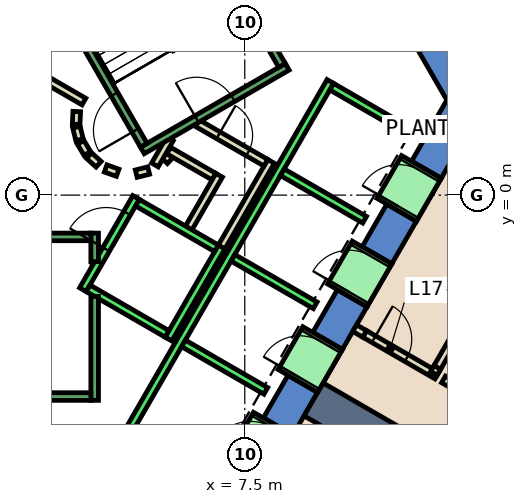
"""IFC4 building model, lengths in metres.
Left out: names, types, materials, properties, quantities, classifications, styles, units other than length and angle.
Written with IfcOpenShell. Run it as: python <this file> out.ifc"""

import sys

from ifc_helpers import new_model, si_unit, direction, frame, frame_2d, origin, place, context, subcontext, project, spatial, polyline, rectangle, outline, extrude, element, fill, save


model = new_model("IFC4")
c1 = context("Model", 3, precision=1e-05, world=origin(), true_north=direction((0.0, 1.0)))
c2 = subcontext(c1, "Body", "Model", "MODEL_VIEW")
j1 = project(units=[si_unit("LENGTHUNIT", "METRE"), si_unit("PLANEANGLEUNIT", "RADIAN")], contexts=[c1])
p1 = place(None, origin())
s1 = spatial("IfcSite", under=j1, at=p1, CompositionType="ELEMENT")
p2 = place(p1, origin())
s2 = spatial("IfcBuilding", under=s1, at=p2, CompositionType="ELEMENT")
p3 = place(p2, frame((0.0, 0.0, 81.2)))
s3 = spatial("IfcBuildingStorey", under=s2, at=p3, CompositionType="ELEMENT", Elevation=81.2)
p4 = place(p3, frame((0.0, 0.0, -0.6)))
e1 = element("IfcWall", 1, at=p4, inside=s3, PredefinedType="SHEAR", context=c2, shape_type="SweptSolid", body=[
    extrude(outline(polyline([(8.517, 11.747), (7.738, 11.298), (12.817, 2.5), (13.856, 2.5), (8.517, 11.747)])), origin(), (0.0, 0.0, 1.0), 5.4),
])
p5 = place(p3, frame((0.0, 0.0, -0.6)))
e2 = element("IfcWall", 2, at=p5, inside=s3, PredefinedType="SHEAR", context=c2, shape_type="SweptSolid", body=[
    extrude(outline(polyline([(9.417, -5.189), (8.638, -4.739), (7.988, -5.864), (8.767, -6.314), (9.417, -5.189)])), origin(), (0.0, 0.0, 1.0), 5.4),
])
p6 = place(p3, frame((0.0, 0.0, -0.6)))
e3 = element("IfcWall", 3, at=p6, inside=s3, PredefinedType="SHEAR", context=c2, shape_type="SweptSolid", body=[
    extrude(outline(polyline([(10.717, -2.937), (9.938, -2.487), (9.288, -3.613), (10.067, -4.063), (10.717, -2.937)])), origin(), (0.0, 0.0, 1.0), 5.4),
])
p7 = place(p3, frame((0.0, 0.0, -0.6)))
e4 = element("IfcWall", 4, at=p7, inside=s3, PredefinedType="SHEAR", context=c2, shape_type="SweptSolid", body=[
    extrude(outline(polyline([(12.017, -0.686), (11.238, -0.236), (10.588, -1.361), (11.367, -1.811), (12.017, -0.686)])), origin(), (0.0, 0.0, 1.0), 5.4),
])
p8 = place(p3, frame((0.0, 0.0, -0.6)))
e5 = element("IfcWall", 5, at=p8, inside=s3, PredefinedType="SHEAR", context=c2, shape_type="SweptSolid", body=[
    extrude(outline(polyline([(11.888, 0.89), (12.667, 0.44), (13.856, 2.5), (12.817, 2.5), (11.888, 0.89)])), origin(), (0.0, 0.0, 1.0), 5.4),
])
p9 = place(p3, frame((0.0, 0.0, 3.6)))
e6 = element("IfcWall", 6, at=p9, inside=s3, PredefinedType="SHEAR", context=c2, shape_type="SweptSolid", body=[
    extrude(outline(polyline([(8.767, -6.314), (7.988, -5.864), (7.338, -6.99), (8.117, -7.44), (8.767, -6.314)])), origin(), (0.0, 0.0, 1.0), 1.2),
])
p10 = place(p3, frame((0.0, 0.0, 3.6)))
e7 = element("IfcWall", 7, at=p10, inside=s3, PredefinedType="SHEAR", context=c2, shape_type="SweptSolid", body=[
    extrude(outline(polyline([(10.067, -4.063), (9.288, -3.613), (8.638, -4.739), (9.417, -5.189), (10.067, -4.063)])), origin(), (0.0, 0.0, 1.0), 1.2),
])
p11 = place(p3, frame((0.0, 0.0, 3.6)))
e8 = element("IfcWall", 8, at=p11, inside=s3, PredefinedType="SHEAR", context=c2, shape_type="SweptSolid", body=[
    extrude(outline(polyline([(11.367, -1.811), (10.588, -1.361), (9.938, -2.487), (10.717, -2.937), (11.367, -1.811)])), origin(), (0.0, 0.0, 1.0), 1.2),
])
p12 = place(p3, frame((0.0, 0.0, 3.6)))
e9 = element("IfcWall", 9, at=p12, inside=s3, PredefinedType="SHEAR", context=c2, shape_type="SweptSolid", body=[
    extrude(outline(polyline([(12.667, 0.44), (11.888, 0.89), (11.238, -0.236), (12.017, -0.686), (12.667, 0.44)])), origin(), (0.0, 0.0, 1.0), 1.2),
])
p13 = place(p3, frame((9.31, -5.375, 0.0), z_axis=(0.0, 0.0, 1.0), x_axis=(0.866022967049, -0.500004220526, 0.0)))
e10 = element("IfcWall", 10, at=p13, inside=s3, PredefinedType="SHEAR", context=c2, shape_type="SweptSolid", body=[
    extrude(rectangle(XDim=35.802, YDim=1.0, at=frame_2d((17.901, 0.0))), origin(), (0.0, 0.0, 1.0), 4.8),
])
p14 = place(p3, frame((5.39, 0.898, 0.0), z_axis=(0.0, 0.0, 1.0), x_axis=(0.673828488714, 0.738887791073, 0.0)))
e11 = element("IfcWall", 11, at=p14, inside=s3, PredefinedType="PARTITIONING", context=c2, shape_type="SweptSolid", body=[
    extrude(rectangle(XDim=0.263, YDim=0.2, at=frame_2d((0.131, 0.0))), origin(), (0.0, 0.0, 1.0), 4.8),
])
p15 = place(p3, frame((5.499, 1.172, 0.0), z_axis=(0.0, 0.0, 1.0), x_axis=(0.866333505267, -0.499465972466, 0.0)))
e12 = element("IfcWall", 12, at=p15, inside=s3, PredefinedType="PARTITIONING", context=c2, shape_type="SweptSolid", body=[
    extrude(rectangle(XDim=1.374, YDim=0.2, at=frame_2d((0.687, 0.0))), origin(), (0.0, 0.0, 1.0), 4.8),
])
p16 = place(p3, frame((6.826, 0.522, 0.0), z_axis=(0.0, 0.0, 1.0), x_axis=(-0.500016722714, -0.866015748706, 0.0)))
e13 = element("IfcWall", 13, at=p16, inside=s3, PredefinedType="PARTITIONING", context=c2, shape_type="SweptSolid", body=[
    extrude(rectangle(XDim=1.7, YDim=0.2, at=frame_2d((0.85, 0.0))), origin(), (0.0, 0.0, 1.0), 4.8),
])
p17 = place(p3, frame((8.192, 0.888, 0.0), z_axis=(0.0, 0.0, 1.0), x_axis=(-0.499940625693, -0.866059680843, 0.0)))
e14 = element("IfcWall", 14, at=p17, inside=s3, PredefinedType="PARTITIONING", context=c2, shape_type="SweptSolid", body=[
    extrude(rectangle(XDim=2.68, YDim=0.2, at=frame_2d((1.34, 0.0))), origin(), (0.0, 0.0, 1.0), 4.8),
])
p18 = place(p3, frame((5.135, 0.793, 0.0), z_axis=(0.0, 0.0, 1.0), x_axis=(0.499526442893, 0.866298639529, 0.0)))
e15 = element("IfcWall", 15, at=p18, inside=s3, PredefinedType="PARTITIONING", context=c2, shape_type="SweptSolid", body=[
    extrude(rectangle(XDim=0.791, YDim=0.2, at=frame_2d((0.396, 0.0))), origin(), (0.0, 0.0, 1.0), 4.8),
])
p19 = place(p3, frame((6.25, 1.894, 0.0), z_axis=(0.0, 0.0, 1.0), x_axis=(0.866043184279, -0.499969202016, 0.0)))
e16 = element("IfcWall", 16, at=p19, inside=s3, PredefinedType="PARTITIONING", context=c2, shape_type="SweptSolid", body=[
    extrude(rectangle(XDim=2.084, YDim=0.2, at=frame_2d((1.042, 0.0))), origin(), (0.0, 0.0, 1.0), 4.8),
])
p20 = place(p19, frame((0.642, 0.0, 0.0)))
e17 = element("IfcOpeningElement", 17, at=p20, cuts=e16, PredefinedType="OPENING", context=c2, shape_type="SweptSolid", body=[
    extrude(rectangle(XDim=0.9, YDim=2.1, at=frame_2d((0.45, 1.05))), frame((0.0, 0.11, 0.0), z_axis=(0.0, -1.0, 0.0), x_axis=(1.0, 0.0, 0.0)), (0.0, 0.0, 1.0), 0.22),
])
p21 = place(p3, frame((3.079, 2.199, 0.0), z_axis=(0.0, 0.0, 1.0), x_axis=(-0.047771483479, -0.998858290933, 0.0)))
e18 = element("IfcWall", 18, at=p21, inside=s3, PredefinedType="PARTITIONING", context=c2, shape_type="SweptSolid", body=[
    extrude(rectangle(XDim=0.337, YDim=0.2, at=frame_2d((0.169, 0.0))), origin(), (0.0, 0.0, 1.0), 4.8),
])
p22 = place(p3, frame((3.07, 1.786, 0.0), z_axis=(0.0, 0.0, 1.0), x_axis=(0.242705583207, -0.970099994784, 0.0)))
e19 = element("IfcWall", 19, at=p22, inside=s3, PredefinedType="PARTITIONING", context=c2, shape_type="SweptSolid", body=[
    extrude(rectangle(XDim=0.338, YDim=0.2, at=frame_2d((0.169, 0.0))), origin(), (0.0, 0.0, 1.0), 4.8),
])
for number, where, z_axis, x_axis in (
    (20, (3.182, 1.388, 0.0), (0.0, 0.0, 1.0), (0.512, -0.859, 0.0)),
    (21, (3.404, 1.039, 0.0), (0.0, 0.0, 1.0), (0.74, -0.672, 0.0)),
):
    element("IfcWall", number, at=place(p3, frame(where, z_axis=z_axis, x_axis=x_axis)), inside=s3, PredefinedType="PARTITIONING", context=c2, shape_type="SweptSolid", body=[
        extrude(rectangle(XDim=0.338, YDim=0.2, at=frame_2d((0.169, 0.0))), origin(), (0.0, 0.0, 1.0), 4.8),
    ])
p23 = place(p3, frame((3.838, 0.702, 0.0), z_axis=(0.0, 0.0, 1.0), x_axis=(0.941035081519, -0.338308993895, 0.0)))
e22 = element("IfcWall", 22, at=p23, inside=s3, PredefinedType="PARTITIONING", context=c2, shape_type="SweptSolid", body=[
    extrude(rectangle(XDim=0.337, YDim=0.2, at=frame_2d((0.168, 0.0))), origin(), (0.0, 0.0, 1.0), 4.8),
])
p24 = place(p3, frame((4.644, 0.564, 0.0), z_axis=(0.0, 0.0, 1.0), x_axis=(0.969929076366, 0.243387729394, 0.0)))
e23 = element("IfcWall", 23, at=p24, inside=s3, PredefinedType="PARTITIONING", context=c2, shape_type="SweptSolid", body=[
    extrude(rectangle(XDim=0.337, YDim=0.2, at=frame_2d((0.168, 0.0))), origin(), (0.0, 0.0, 1.0), 4.8),
])
p25 = place(p3, frame((2.012, 3.186, 0.0), z_axis=(0.0, 0.0, 1.0), x_axis=(0.865891012941, -0.500232699559, 0.0)))
e24 = element("IfcWall", 24, at=p25, inside=s3, PredefinedType="PARTITIONING", context=c2, shape_type="SweptSolid", body=[
    extrude(rectangle(XDim=1.449, YDim=0.2, at=frame_2d((0.725, 0.0))), origin(), (0.0, 0.0, 1.0), 4.8),
])
p26 = place(p3, frame((10.392, -3.5, 0.0), z_axis=(0.0, 0.0, 1.0), x_axis=(0.865244904171, -0.501349434832, 0.0)))
e25 = element("IfcWall", 25, at=p26, inside=s3, PredefinedType="PARTITIONING", context=c2, shape_type="SweptSolid", body=[
    extrude(rectangle(XDim=0.307, YDim=0.2, at=frame_2d((0.154, 0.0))), origin(), (0.0, 0.0, 1.0), 1.7),
])
p27 = place(p3, frame((12.729, -4.849, 0.0), z_axis=(0.0, 0.0, 1.0), x_axis=(0.866039668463, -0.499975292037, 0.0)))
e26 = element("IfcWall", 26, at=p27, inside=s3, PredefinedType="PARTITIONING", context=c2, shape_type="SweptSolid", body=[
    extrude(rectangle(XDim=33.573, YDim=0.2, at=frame_2d((16.787, 0.0))), origin(), (0.0, 0.0, 1.0), 4.8),
])
p28 = place(p3, frame((10.658, -3.654, 0.0), z_axis=(0.0, 0.0, 1.0), x_axis=(0.866074224396, -0.499915430684, 0.0)))
e27 = element("IfcWall", 27, at=p28, inside=s3, PredefinedType="PARTITIONING", context=c2, shape_type="SweptSolid", body=[
    extrude(rectangle(XDim=2.19, YDim=0.2, at=frame_2d((1.095, 0.0))), origin(), (0.0, 0.0, 1.0), 4.8),
])
p29 = place(p28, frame((0.272, 0.0, 0.0)))
e28 = element("IfcOpeningElement", 28, at=p29, cuts=e27, PredefinedType="OPENING", context=c2, shape_type="SweptSolid", body=[
    extrude(rectangle(XDim=1.0, YDim=2.1, at=frame_2d((0.5, 1.05))), frame((0.0, 0.11, 0.0), z_axis=(0.0, -1.0, 0.0), x_axis=(1.0, 0.0, 0.0)), (0.0, 0.0, 1.0), 0.22),
])
p30 = place(p3, frame((13.02, -3.749, 0.0), z_axis=(0.0, 0.0, 1.0), x_axis=(-0.500644484719, -0.865652990476, 0.0)))
e29 = element("IfcWall", 29, at=p30, inside=s3, PredefinedType="PARTITIONING", context=c2, shape_type="SweptSolid", body=[
    extrude(rectangle(XDim=0.909, YDim=0.2, at=frame_2d((0.455, 0.0))), origin(), (0.0, 0.0, 1.0), 1.7),
])
p31 = place(p3, frame((12.565, -4.536, 0.0), z_axis=(0.0, 0.0, 1.0), x_axis=(-0.498550056236, -0.866860912388, 0.0)))
e30 = element("IfcWall", 30, at=p31, inside=s3, PredefinedType="PARTITIONING", context=c2, shape_type="SweptSolid", body=[
    extrude(rectangle(XDim=0.174, YDim=0.2, at=frame_2d((0.087, 0.0))), origin(), (0.0, 0.0, 1.0), 4.8),
])
p32 = place(p3, frame((3.24, -2.488, 0.0), z_axis=(0.0, 0.0, 1.0), x_axis=(0.49994636267, 0.866056369097, 0.0)))
e31 = element("IfcWall", 31, at=p32, inside=s3, PredefinedType="STANDARD", context=c2, shape_type="SweptSolid", body=[
    extrude(rectangle(XDim=2.8, YDim=0.2, at=frame_2d((1.4, 0.0))), origin(), (0.0, 0.0, 1.0), 4.8),
])
p33 = place(p32, frame((1.225, 0.0, 0.0)))
e32 = element("IfcOpeningElement", 32, at=p33, cuts=e31, PredefinedType="OPENING", context=c2, shape_type="SweptSolid", body=[
    extrude(rectangle(XDim=1.1, YDim=2.1, at=frame_2d((0.55, 1.05))), frame((0.0, 0.11, 0.0), z_axis=(0.0, -1.0, 0.0), x_axis=(1.0, 0.0, 0.0)), (0.0, 0.0, 1.0), 0.22),
])
p34 = place(p3, frame((5.492, -3.788, 0.0), z_axis=(0.0, 0.0, 1.0), x_axis=(0.500011755427, 0.866018616679, 0.0)))
e33 = element("IfcWall", 33, at=p34, inside=s3, PredefinedType="STANDARD", context=c2, shape_type="SweptSolid", body=[
    extrude(rectangle(XDim=2.8, YDim=0.2, at=frame_2d((1.4, 0.0))), origin(), (0.0, 0.0, 1.0), 4.8),
])
p35 = place(p3, frame((3.377, -2.452, 0.0), z_axis=(0.0, 0.0, 1.0), x_axis=(0.865955154139, -0.50012165622, 0.0)))
e34 = element("IfcWall", 34, at=p35, inside=s3, PredefinedType="STANDARD", context=c2, shape_type="SweptSolid", body=[
    extrude(rectangle(XDim=2.4, YDim=0.2, at=frame_2d((1.2, 0.0))), origin(), (0.0, 0.0, 1.0), 4.8),
])
p36 = place(p3, frame((4.677, -0.2, 0.0), z_axis=(0.0, 0.0, 1.0), x_axis=(0.865973769406, -0.500089422704, 0.0)))
e35 = element("IfcWall", 35, at=p36, inside=s3, PredefinedType="STANDARD", context=c2, shape_type="SweptSolid", body=[
    extrude(rectangle(XDim=2.399, YDim=0.2, at=frame_2d((1.2, 0.0))), origin(), (0.0, 0.0, 1.0), 4.8),
])
p37 = place(p3, frame((4.451, -6.19, 0.0), z_axis=(0.0, 0.0, 1.0), x_axis=(0.50000090737, 0.866024879913, 0.0)))
e36 = element("IfcWall", 36, at=p37, inside=s3, PredefinedType="STANDARD", context=c2, shape_type="SweptSolid", body=[
    extrude(rectangle(XDim=10.6, YDim=0.2, at=frame_2d((5.3, 0.0))), origin(), (0.0, 0.0, 1.0), 4.8),
])
for number, where, z_axis, x_axis in (
    (37, (5.888, -3.902, 0.0), (0.0, 0.0, 1.0), (0.866, -0.5, 0.0)),
    (38, (7.188, -1.65, 0.0), (0.0, 0.0, 1.0), (0.866, -0.5, 0.0)),
    (39, (8.488, 0.602, 0.0), (0.0, 0.0, 1.0), (0.866, -0.5, 0.0)),
):
    element("IfcWall", number, at=place(p3, frame(where, z_axis=z_axis, x_axis=x_axis)), inside=s3, PredefinedType="STANDARD", context=c2, shape_type="SweptSolid", body=[
        extrude(rectangle(XDim=2.5, YDim=0.2, at=frame_2d((1.25, 0.0))), origin(), (0.0, 0.0, 1.0), 4.8),
    ])
p38 = place(p3, frame((9.788, 2.853, 0.0), z_axis=(0.0, 0.0, 1.0), x_axis=(0.865998541277, -0.500046524342, 0.0)))
e40 = element("IfcWall", 40, at=p38, inside=s3, PredefinedType="STANDARD", context=c2, shape_type="SweptSolid", body=[
    extrude(rectangle(XDim=2.5, YDim=0.2, at=frame_2d((1.25, 0.0))), origin(), (0.0, 0.0, 1.0), 4.8),
])
p39 = place(p3, frame((7.598, -7.14, 0.0), z_axis=(0.0, 0.0, 1.0), x_axis=(0.500362116554, 0.865816234728, 0.0)))
e41 = element("IfcWall", 41, at=p39, inside=s3, PredefinedType="STANDARD", context=c2, shape_type="SweptSolid", body=[
    extrude(rectangle(XDim=1.299, YDim=1.2, at=frame_2d((0.65, 0.0))), origin(), (0.0, 0.0, 1.0), 2.4),
])
p40 = place(p39, frame((0.1, 0.0, 0.0)))
e42 = element("IfcOpeningElement", 42, at=p40, cuts=e41, PredefinedType="OPENING", context=c2, shape_type="SweptSolid", body=[
    extrude(rectangle(XDim=1.1, YDim=2.3, at=frame_2d((0.55, 1.15))), frame((0.0, 0.61, 0.0), z_axis=(0.0, -1.0, 0.0), x_axis=(1.0, 0.0, 0.0)), (0.0, 0.0, 1.0), 1.22),
])
p41 = place(p3, frame((8.898, -4.889, 0.0), z_axis=(0.0, 0.0, 1.0), x_axis=(0.500036693733, 0.866004217611, 0.0)))
e43 = element("IfcWall", 43, at=p41, inside=s3, PredefinedType="STANDARD", context=c2, shape_type="SweptSolid", body=[
    extrude(rectangle(XDim=1.3, YDim=1.2, at=frame_2d((0.65, 0.0))), origin(), (0.0, 0.0, 1.0), 2.4),
])
p42 = place(p41, frame((0.1, 0.0, 0.0)))
e44 = element("IfcOpeningElement", 44, at=p42, cuts=e43, PredefinedType="OPENING", context=c2, shape_type="SweptSolid", body=[
    extrude(rectangle(XDim=1.1, YDim=2.3, at=frame_2d((0.55, 1.15))), frame((0.0, 0.61, 0.0), z_axis=(0.0, -1.0, 0.0), x_axis=(1.0, 0.0, 0.0)), (0.0, 0.0, 1.0), 1.22),
])
p43 = place(p3, frame((10.198, -2.637, 0.0), z_axis=(0.0, 0.0, 1.0), x_axis=(0.49989585183, 0.866085525409, 0.0)))
e45 = element("IfcWall", 45, at=p43, inside=s3, PredefinedType="STANDARD", context=c2, shape_type="SweptSolid", body=[
    extrude(rectangle(XDim=1.3, YDim=1.2, at=frame_2d((0.65, 0.0))), origin(), (0.0, 0.0, 1.0), 2.4),
])
p44 = place(p43, frame((0.1, 0.0, 0.0)))
e46 = element("IfcOpeningElement", 46, at=p44, cuts=e45, PredefinedType="OPENING", context=c2, shape_type="SweptSolid", body=[
    extrude(rectangle(XDim=1.1, YDim=2.3, at=frame_2d((0.55, 1.15))), frame((0.0, 0.61, 0.0), z_axis=(0.0, -1.0, 0.0), x_axis=(1.0, 0.0, 0.0)), (0.0, 0.0, 1.0), 1.22),
])
p45 = place(p3, frame((11.498, -0.385, 0.0), z_axis=(0.0, 0.0, 1.0), x_axis=(0.500221244143, 0.865897630733, 0.0)))
e47 = element("IfcWall", 47, at=p45, inside=s3, PredefinedType="STANDARD", context=c2, shape_type="SweptSolid", body=[
    extrude(rectangle(XDim=1.299, YDim=1.2, at=frame_2d((0.65, 0.0))), origin(), (0.0, 0.0, 1.0), 2.4),
])
p46 = place(p45, frame((0.1, 0.0, 0.0)))
e48 = element("IfcOpeningElement", 48, at=p46, cuts=e47, PredefinedType="OPENING", context=c2, shape_type="SweptSolid", body=[
    extrude(rectangle(XDim=1.1, YDim=2.3, at=frame_2d((0.55, 1.15))), frame((0.0, 0.61, 0.0), z_axis=(0.0, -1.0, 0.0), x_axis=(1.0, 0.0, 0.0)), (0.0, 0.0, 1.0), 1.22),
])
p47 = place(p3, frame((3.55, -2.667, 0.0), z_axis=(0.0, 0.0, 1.0), x_axis=(0.0, -1.0, 0.0)))
e49 = element("IfcWall", 49, at=p47, inside=s3, PredefinedType="STANDARD", context=c2, shape_type="SweptSolid", body=[
    extrude(rectangle(XDim=2.733, YDim=0.2, at=frame_2d((1.366, 0.0))), origin(), (0.0, 0.0, 1.0), 4.8),
])
p48 = place(p3, frame((3.55, -1.0, 0.0), z_axis=(0.0, 0.0, 1.0), x_axis=(0.0, -1.0, 0.0)))
e50 = element("IfcWall", 50, at=p48, inside=s3, PredefinedType="STANDARD", context=c2, shape_type="SweptSolid", body=[
    extrude(rectangle(XDim=0.751, YDim=0.2, at=frame_2d((0.375, 0.0))), origin(), (0.0, 0.0, 1.0), 4.8),
])
p49 = place(p3, frame((-3.45, -1.1, 0.0), z_axis=(0.0, 0.0, 1.0), x_axis=(1.0, 0.0, 0.0)))
e51 = element("IfcWall", 51, at=p49, inside=s3, PredefinedType="STANDARD", context=c2, shape_type="SweptSolid", body=[
    extrude(rectangle(XDim=6.9, YDim=0.2, at=frame_2d((3.45, 0.0))), origin(), (0.0, 0.0, 1.0), 4.8),
])
p50 = place(p49, frame((0.45, 0.0, 0.0)))
e52 = element("IfcOpeningElement", 52, at=p50, cuts=e51, PredefinedType="OPENING", context=c2, shape_type="SweptSolid", body=[
    extrude(rectangle(XDim=1.1, YDim=2.2, at=frame_2d((0.55, 1.1))), frame((0.0, 0.11, 0.0), z_axis=(0.0, -1.0, 0.0), x_axis=(1.0, 0.0, 0.0)), (0.0, 0.0, 1.0), 0.22),
])
p51 = place(p3, frame((-3.45, -5.3, 0.0), z_axis=(0.0, 0.0, 1.0), x_axis=(1.0, 0.0, 0.0)))
e53 = element("IfcWall", 53, at=p51, inside=s3, PredefinedType="STANDARD", context=c2, shape_type="SweptSolid", body=[
    extrude(rectangle(XDim=6.9, YDim=0.2, at=frame_2d((3.45, 0.0))), origin(), (0.0, 0.0, 1.0), 4.8),
])
p52 = place(p3, frame((4.806, 1.176, 0.0), z_axis=(0.0, 0.0, 1.0), x_axis=(0.866059941101, 0.499940174841, 0.0)))
e54 = element("IfcWall", 54, at=p52, inside=s3, PredefinedType="STANDARD", context=c2, shape_type="SweptSolid", body=[
    extrude(rectangle(XDim=4.4, YDim=0.2, at=frame_2d((2.2, 0.0))), origin(), (0.0, 0.0, 1.0), 4.8),
])
p53 = place(p52, frame((1.65, 0.0, 0.0)))
e55 = element("IfcOpeningElement", 55, at=p53, cuts=e54, PredefinedType="OPENING", context=c2, shape_type="SweptSolid", body=[
    extrude(rectangle(XDim=1.1, YDim=2.2, at=frame_2d((0.55, 1.1))), frame((0.0, 0.11, 0.0), z_axis=(0.0, -1.0, 0.0), x_axis=(1.0, 0.0, 0.0)), (0.0, 0.0, 1.0), 0.22),
])
p54 = place(p3, frame((4.843, 1.312, 0.0), z_axis=(0.0, 0.0, 1.0), x_axis=(-0.499963383562, 0.866046543262, 0.0)))
e56 = element("IfcWall", 56, at=p54, inside=s3, PredefinedType="STANDARD", context=c2, shape_type="SweptSolid", body=[
    extrude(rectangle(XDim=6.9, YDim=0.2, at=frame_2d((3.45, 0.0))), origin(), (0.0, 0.0, 1.0), 4.8),
])
p55 = place(p54, frame((0.45, 0.0, 0.0)))
e57 = element("IfcOpeningElement", 57, at=p55, cuts=e56, PredefinedType="OPENING", context=c2, shape_type="SweptSolid", body=[
    extrude(rectangle(XDim=1.1, YDim=2.2, at=frame_2d((0.55, 1.1))), frame((0.0, 0.11, 0.0), z_axis=(0.0, -1.0, 0.0), x_axis=(1.0, 0.0, 0.0)), (0.0, 0.0, 1.0), 0.22),
])
p56 = place(p3, frame((8.48, 3.412, 0.0), z_axis=(0.0, 0.0, 1.0), x_axis=(-0.499978703459, 0.866037698999, 0.0)))
e58 = element("IfcWall", 58, at=p56, inside=s3, PredefinedType="STANDARD", context=c2, shape_type="SweptSolid", body=[
    extrude(rectangle(XDim=6.9, YDim=0.2, at=frame_2d((3.45, 0.0))), origin(), (0.0, 0.0, 1.0), 4.8),
])
p57 = place(p29, origin())
e59 = element("IfcDoor", 59, at=p57, inside=s3, OperationType="SINGLE_SWING_LEFT", PredefinedType="DOOR", context=c2, shape_type="SweptSolid", body=[
    extrude(rectangle(XDim=1.0, YDim=2.1, at=frame_2d((0.5, 1.05))), frame((0.0, 0.025, 0.0), z_axis=(0.0, -1.0, 0.0), x_axis=(1.0, 0.0, 0.0)), (0.0, 0.0, 1.0), 0.05),
])
fill(e28, e59)
p58 = place(p20, origin())
e60 = element("IfcDoor", 60, at=p58, inside=s3, OperationType="SINGLE_SWING_LEFT", PredefinedType="DOOR", context=c2, shape_type="SweptSolid", body=[
    extrude(rectangle(XDim=0.9, YDim=2.1, at=frame_2d((0.45, 1.05))), frame((0.0, 0.025, 0.0), z_axis=(0.0, -1.0, 0.0), x_axis=(1.0, 0.0, 0.0)), (0.0, 0.0, 1.0), 0.05),
])
fill(e17, e60)
p59 = place(p42, origin())
e61 = element("IfcDoor", 61, at=p59, inside=s3, OperationType="SLIDING_TO_LEFT", PredefinedType="DOOR", context=c2, shape_type="SweptSolid", body=[
    extrude(rectangle(XDim=1.1, YDim=2.3, at=frame_2d((0.55, 1.15))), frame((0.0, 0.025, 0.0), z_axis=(0.0, -1.0, 0.0), x_axis=(1.0, 0.0, 0.0)), (0.0, 0.0, 1.0), 0.05),
])
fill(e44, e61)
p60 = place(p44, origin())
e62 = element("IfcDoor", 62, at=p60, inside=s3, OperationType="SLIDING_TO_LEFT", PredefinedType="DOOR", context=c2, shape_type="SweptSolid", body=[
    extrude(rectangle(XDim=1.1, YDim=2.3, at=frame_2d((0.55, 1.15))), frame((0.0, 0.025, 0.0), z_axis=(0.0, -1.0, 0.0), x_axis=(1.0, 0.0, 0.0)), (0.0, 0.0, 1.0), 0.05),
])
fill(e46, e62)
p61 = place(p46, origin())
e63 = element("IfcDoor", 63, at=p61, inside=s3, OperationType="SLIDING_TO_LEFT", PredefinedType="DOOR", context=c2, shape_type="SweptSolid", body=[
    extrude(rectangle(XDim=1.1, YDim=2.3, at=frame_2d((0.55, 1.15))), frame((0.0, 0.025, 0.0), z_axis=(0.0, -1.0, 0.0), x_axis=(1.0, 0.0, 0.0)), (0.0, 0.0, 1.0), 0.05),
])
fill(e48, e63)
p62 = place(p33, origin())
e64 = element("IfcDoor", 64, at=p62, inside=s3, OperationType="SLIDING_TO_LEFT", PredefinedType="DOOR", context=c2, shape_type="SweptSolid", body=[
    extrude(rectangle(XDim=1.1, YDim=2.1, at=frame_2d((0.55, 1.05))), frame((0.0, 0.025, 0.0), z_axis=(0.0, -1.0, 0.0), x_axis=(1.0, 0.0, 0.0)), (0.0, 0.0, 1.0), 0.05),
])
fill(e32, e64)
p63 = place(p55, origin())
e65 = element("IfcDoor", 65, at=p63, inside=s3, OperationType="SINGLE_SWING_LEFT", PredefinedType="DOOR", context=c2, shape_type="SweptSolid", body=[
    extrude(rectangle(XDim=1.1, YDim=2.2, at=frame_2d((0.55, 1.1))), frame((0.0, 0.025, 0.0), z_axis=(0.0, -1.0, 0.0), x_axis=(1.0, 0.0, 0.0)), (0.0, 0.0, 1.0), 0.05),
])
fill(e57, e65)
p64 = place(p53, origin())
e66 = element("IfcDoor", 66, at=p64, inside=s3, OperationType="SINGLE_SWING_LEFT", PredefinedType="DOOR", context=c2, shape_type="SweptSolid", body=[
    extrude(rectangle(XDim=1.1, YDim=2.2, at=frame_2d((0.55, 1.1))), frame((0.0, 0.025, 0.0), z_axis=(0.0, -1.0, 0.0), x_axis=(1.0, 0.0, 0.0)), (0.0, 0.0, 1.0), 0.05),
])
fill(e55, e66)
save(model, sys.argv[1])
